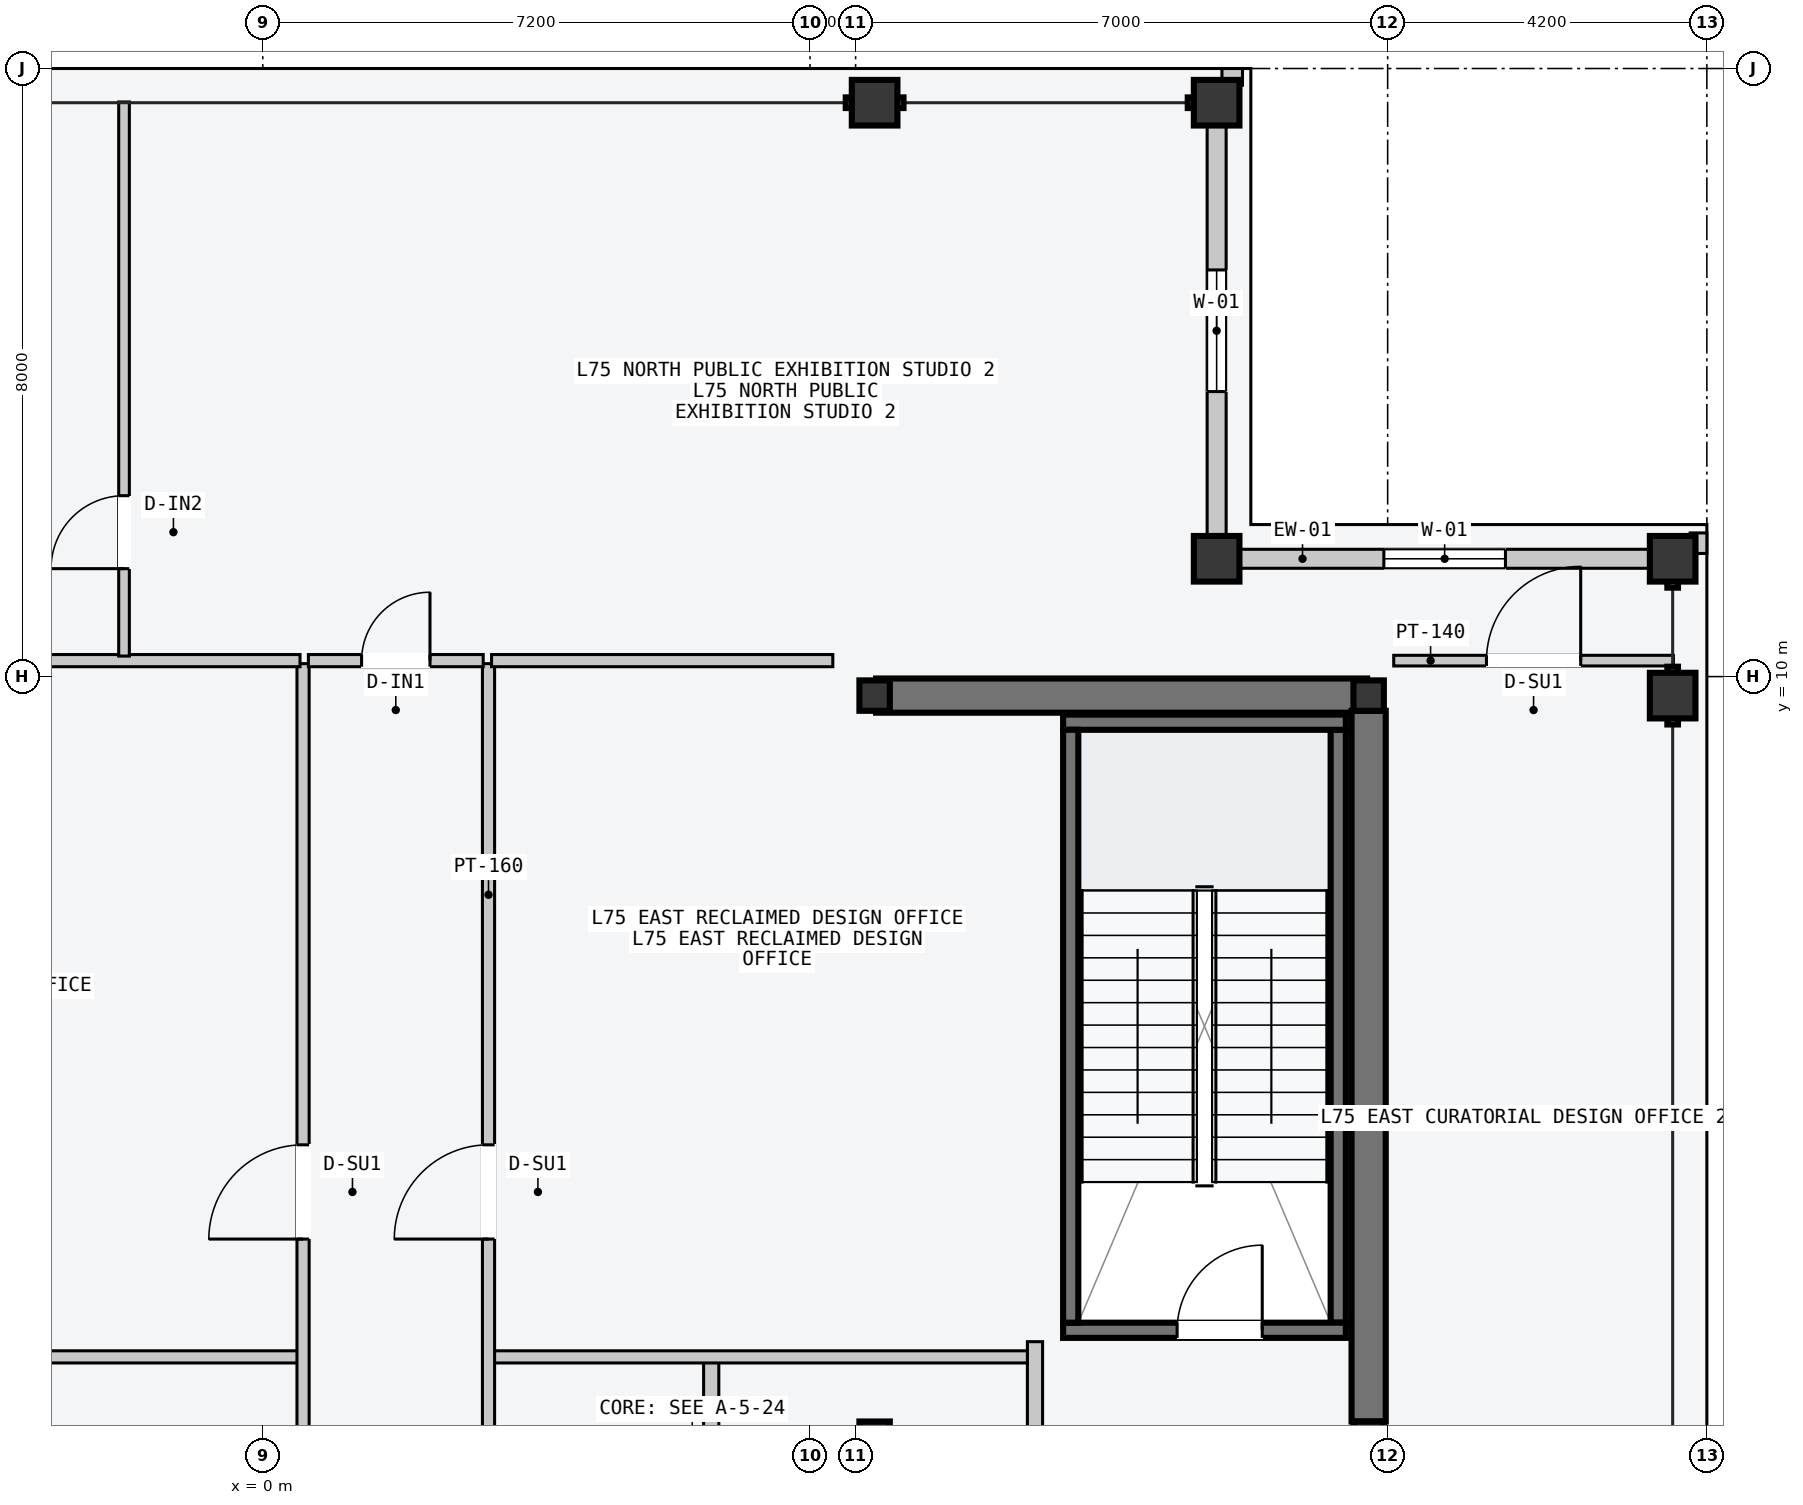
"""IFC4 building model, lengths in metres.
Left out: names, types, materials, properties, quantities, classifications, styles, units other than length and angle.
Written with IfcOpenShell. Run it as: python <this file> out.ifc"""

import sys

from ifc_helpers import new_model, si_unit, direction, frame, frame_2d, origin, origin_2d, place, context, subcontext, project, spatial, rectangle, hollow_rectangle, i_section, extrude, element, fill, save


model = new_model("IFC4")
c1 = context("Model", 3, precision=1e-05, world=origin(), true_north=direction((0.0, 1.0)))
c2 = subcontext(c1, "Body", "Model", "MODEL_VIEW")
j1 = project(units=[si_unit("LENGTHUNIT", "METRE"), si_unit("PLANEANGLEUNIT", "RADIAN")], contexts=[c1])
p1 = place(None, origin())
s1 = spatial("IfcSite", under=j1, at=p1, CompositionType="ELEMENT")
p2 = place(p1, origin())
s2 = spatial("IfcBuilding", under=s1, at=p2, CompositionType="ELEMENT")
p3 = place(p2, frame((0.0, 0.0, 284.4)))
s3 = spatial("IfcBuildingStorey", under=s2, at=p3, CompositionType="ELEMENT", Elevation=284.4)
p4 = place(p3, frame((8.07, 9.75, -0.2), z_axis=(0.0, 0.0, 1.0), x_axis=(1.0, 0.0, 0.0)))
e1 = element("IfcWall", 1, at=p4, inside=s3, PredefinedType="SHEAR", context=c2, shape_type="SweptSolid", body=[
    extrude(rectangle(XDim=6.46, YDim=0.45, at=frame_2d((3.23, 0.0))), origin(), (0.0, 0.0, 1.0), 4.8),
])
p5 = place(p3, frame((14.55, 0.2, -0.2), z_axis=(0.0, 0.0, 1.0), x_axis=(0.0, 1.0, 0.0)))
e2 = element("IfcWall", 2, at=p5, inside=s3, PredefinedType="SHEAR", context=c2, shape_type="SweptSolid", body=[
    extrude(rectangle(XDim=9.35, YDim=0.45, at=frame_2d((4.675, 0.0))), origin(), (0.0, 0.0, 1.0), 4.8),
])
p6 = place(p3, frame((14.15, 1.5, -0.2), z_axis=(0.0, 0.0, 1.0), x_axis=(0.0, 1.0, 0.0)))
e3 = element("IfcWall", 3, at=p6, inside=s3, PredefinedType="SOLIDWALL", context=c2, shape_type="SweptSolid", body=[
    extrude(rectangle(XDim=7.8, YDim=0.2, at=frame_2d((3.9, 0.0))), origin(), (0.0, 0.0, 1.0), 4.8),
])
p7 = place(p3, frame((10.53, 1.4, -0.2), z_axis=(0.0, 0.0, 1.0), x_axis=(1.0, 0.0, 0.0)))
e4 = element("IfcWall", 4, at=p7, inside=s3, PredefinedType="SOLIDWALL", context=c2, shape_type="SweptSolid", body=[
    extrude(rectangle(XDim=3.72, YDim=0.2, at=frame_2d((1.86, 0.0))), origin(), (0.0, 0.0, 1.0), 4.8),
])
p8 = place(p7, frame((1.5, 0.0, 0.2)))
e5 = element("IfcOpeningElement", 5, at=p8, cuts=e4, PredefinedType="OPENING", context=c2, shape_type="SweptSolid", body=[
    extrude(rectangle(XDim=1.12, YDim=2.18, at=frame_2d((0.56, 1.09))), frame((0.0, 0.11, 0.0), z_axis=(0.0, -1.0, 0.0), x_axis=(1.0, 0.0, 0.0)), (0.0, 0.0, 1.0), 0.22),
])
p9 = place(p3, frame((10.53, 9.4, -0.2), z_axis=(0.0, 0.0, 1.0), x_axis=(1.0, 0.0, 0.0)))
e6 = element("IfcWall", 6, at=p9, inside=s3, PredefinedType="SOLIDWALL", context=c2, shape_type="SweptSolid", body=[
    extrude(rectangle(XDim=3.72, YDim=0.2, at=frame_2d((1.86, 0.0))), origin(), (0.0, 0.0, 1.0), 4.8),
])
p10 = place(p3, frame((10.63, 1.5, -0.2), z_axis=(0.0, 0.0, 1.0), x_axis=(0.0, 1.0, 0.0)))
e7 = element("IfcWall", 7, at=p10, inside=s3, PredefinedType="SOLIDWALL", context=c2, shape_type="SweptSolid", body=[
    extrude(rectangle(XDim=7.8, YDim=0.2, at=frame_2d((3.9, 0.0))), origin(), (0.0, 0.0, 1.0), 4.8),
])
for number, where, z_axis, x_axis in (
    (8, (8.05, 0.0, 0.0), (0.0, 0.0, 1.0), (1.0, 0.0, 0.0)),
    (9, (8.05, 9.75, 0.0), (0.0, 0.0, 1.0), (1.0, 0.0, 0.0)),
    (10, (14.55, 0.0, 0.0), (0.0, 0.0, 1.0), (1.0, 0.0, 0.0)),
    (11, (14.55, 9.75, 0.0), (0.0, 0.0, 1.0), (1.0, 0.0, 0.0)),
):
    element("IfcColumn", number, at=place(p3, frame(where, z_axis=z_axis, x_axis=x_axis)), inside=s3, PredefinedType="COLUMN", context=c2, shape_type="SweptSolid", body=[
        extrude(i_section(OverallWidth=0.4, OverallDepth=0.4, WebThickness=0.013, FlangeThickness=0.021, at=origin_2d()), origin(), (0.0, 0.0, 1.0), 4.8),
    ])
for number, where, z_axis, x_axis in (
    (12, (8.05, 17.55, 0.0), (0.0, 0.0, 1.0), (1.0, 0.0, 0.0)),
    (13, (12.55, 17.55, 0.0), (0.0, 0.0, 1.0), (1.0, 0.0, 0.0)),
    (14, (18.55, 9.75, 0.0), (0.0, 0.0, 1.0), (0.0, 1.0, 0.0)),
    (15, (18.55, 11.55, 0.0), (0.0, 0.0, 1.0), (0.0, 1.0, 0.0)),
    (16, (12.55, 11.55, 0.0), (0.0, 0.0, 1.0), (1.0, 0.0, 0.0)),
):
    element("IfcColumn", number, at=place(p3, frame(where, z_axis=z_axis, x_axis=x_axis)), inside=s3, PredefinedType="COLUMN", context=c2, shape_type="SweptSolid", body=[
        extrude(hollow_rectangle(XDim=0.6, YDim=0.6, WallThickness=0.025, at=origin_2d()), origin(), (0.0, 0.0, 1.0), 4.8),
    ])
p11 = place(p3, frame((12.86, 11.55, 0.0), z_axis=(0.0, 0.0, 1.0), x_axis=(1.0, 0.0, 0.0)))
e17 = element("IfcWall", 17, at=p11, inside=s3, PredefinedType="STANDARD", context=c2, shape_type="SweptSolid", body=[
    extrude(rectangle(XDim=5.38, YDim=0.25, at=frame_2d((2.69, 0.0))), origin(), (0.0, 0.0, 1.0), 4.05),
])
p12 = place(p11, frame((1.89, 0.0, 0.85)))
e18 = element("IfcOpeningElement", 18, at=p12, cuts=e17, PredefinedType="OPENING", context=c2, shape_type="SweptSolid", body=[
    extrude(rectangle(XDim=1.6, YDim=2.0, at=frame_2d((0.8, 1.0))), frame((0.0, 0.135, 0.0), z_axis=(0.0, -1.0, 0.0), x_axis=(1.0, 0.0, 0.0)), (0.0, 0.0, 1.0), 0.27),
])
p13 = place(p3, frame((12.55, 11.86, 0.0), z_axis=(0.0, 0.0, 1.0), x_axis=(0.0, 1.0, 0.0)))
e19 = element("IfcWall", 19, at=p13, inside=s3, PredefinedType="STANDARD", context=c2, shape_type="SweptSolid", body=[
    extrude(rectangle(XDim=5.38, YDim=0.25, at=frame_2d((2.69, 0.0))), origin(), (0.0, 0.0, 1.0), 4.05),
])
p14 = place(p13, frame((1.89, 0.0, 0.85)))
e20 = element("IfcOpeningElement", 20, at=p14, cuts=e19, PredefinedType="OPENING", context=c2, shape_type="SweptSolid", body=[
    extrude(rectangle(XDim=1.6, YDim=2.0, at=frame_2d((0.8, 1.0))), frame((0.0, 0.135, 0.0), z_axis=(0.0, -1.0, 0.0), x_axis=(1.0, 0.0, 0.0)), (0.0, 0.0, 1.0), 0.27),
])
for number, where, z_axis, x_axis in (
    (21, (12.62, 17.89, 0.0), (0.0, 0.0, 1.0), (1.0, 0.0, 0.0)),
    (22, (18.89, 11.62, 0.0), (0.0, 0.0, 1.0), (0.0, 1.0, 0.0)),
):
    element("IfcWall", number, at=place(p3, frame(where, z_axis=z_axis, x_axis=x_axis)), inside=s3, PredefinedType="PARAPET", context=c2, shape_type="SweptSolid", body=[
        extrude(rectangle(XDim=0.27, YDim=0.22, at=frame_2d((0.135, 0.0))), origin(), (0.0, 0.0, 1.0), 1.2),
    ])
p15 = place(p3, frame((5.9, -9.45, 0.0), z_axis=(0.0, 0.0, 1.0), x_axis=(0.0, 1.0, 0.0)))
e23 = element("IfcWall", 23, at=p15, inside=s3, PredefinedType="PARTITIONING", context=c2, shape_type="SweptSolid", body=[
    extrude(rectangle(XDim=10.5, YDim=0.2, at=frame_2d((5.25, 0.0))), origin(), (0.0, 0.0, 1.0), 4.6),
])
p16 = place(p15, frame((3.9, 0.0, 0.0)))
e24 = element("IfcOpeningElement", 24, at=p16, cuts=e23, PredefinedType="OPENING", context=c2, shape_type="SweptSolid", body=[
    extrude(rectangle(XDim=1.5, YDim=2.2, at=frame_2d((0.75, 1.1))), frame((0.0, 0.11, 0.0), z_axis=(0.0, -1.0, 0.0), x_axis=(1.0, 0.0, 0.0)), (0.0, 0.0, 1.0), 0.22),
])
p17 = place(p3, frame((10.16, -2.55, 0.0), z_axis=(0.0, 0.0, 1.0), x_axis=(0.0, 1.0, 0.0)))
e25 = element("IfcWall", 25, at=p17, inside=s3, PredefinedType="PARTITIONING", context=c2, shape_type="SweptSolid", body=[
    extrude(rectangle(XDim=3.8, YDim=0.2, at=frame_2d((1.9, 0.0))), origin(), (0.0, 0.0, 1.0), 4.6),
])
p18 = place(p17, frame((1.3, 0.0, 0.0)))
e26 = element("IfcOpeningElement", 26, at=p18, cuts=e25, PredefinedType="OPENING", context=c2, shape_type="SweptSolid", body=[
    extrude(rectangle(XDim=1.1, YDim=2.15, at=frame_2d((0.55, 1.075))), frame((0.0, 0.11, 0.0), z_axis=(0.0, -1.0, 0.0), x_axis=(1.0, 0.0, 0.0)), (0.0, 0.0, 1.0), 0.22),
])
p19 = place(p3, frame((-10.05, 1.05, 0.0), z_axis=(0.0, 0.0, 1.0), x_axis=(1.0, 0.0, 0.0)))
e27 = element("IfcWall", 27, at=p19, inside=s3, PredefinedType="PARTITIONING", context=c2, shape_type="SweptSolid", body=[
    extrude(rectangle(XDim=10.54, YDim=0.16, at=frame_2d((5.27, 0.0))), origin(), (0.0, 0.0, 1.0), 4.6),
])
p20 = place(p3, frame((0.53, -3.5, 0.0), z_axis=(0.0, 0.0, 1.0), x_axis=(0.0, 1.0, 0.0)))
e28 = element("IfcWall", 28, at=p20, inside=s3, PredefinedType="PARTITIONING", context=c2, shape_type="SweptSolid", body=[
    extrude(rectangle(XDim=13.67, YDim=0.16, at=frame_2d((6.835, 0.0))), origin(), (0.0, 0.0, 1.0), 4.6),
])
p21 = place(p20, frame((6.1, 0.0, 0.0)))
e29 = element("IfcOpeningElement", 29, at=p21, cuts=e28, PredefinedType="OPENING", context=c2, shape_type="SweptSolid", body=[
    extrude(rectangle(XDim=1.24, YDim=2.24, at=frame_2d((0.62, 1.12))), frame((0.0, 0.09, 0.0), z_axis=(0.0, -1.0, 0.0), x_axis=(1.0, 0.0, 0.0)), (0.0, 0.0, 1.0), 0.18),
])
p22 = place(p20, frame((1.6, 0.0, 0.0)))
e30 = element("IfcOpeningElement", 30, at=p22, cuts=e28, PredefinedType="OPENING", context=c2, shape_type="SweptSolid", body=[
    extrude(rectangle(XDim=0.96, YDim=2.18, at=frame_2d((0.48, 1.09))), frame((0.0, 0.09, 0.0), z_axis=(0.0, -1.0, 0.0), x_axis=(1.0, 0.0, 0.0)), (0.0, 0.0, 1.0), 0.18),
])
p23 = place(p3, frame((-7.5, 10.21, 0.0), z_axis=(0.0, 0.0, 1.0), x_axis=(1.0, 0.0, 0.0)))
e31 = element("IfcWall", 31, at=p23, inside=s3, PredefinedType="PARTITIONING", context=c2, shape_type="SweptSolid", body=[
    extrude(rectangle(XDim=7.99, YDim=0.16, at=frame_2d((3.995, 0.0))), origin(), (0.0, 0.0, 1.0), 4.6),
])
p24 = place(p3, frame((3.01, 1.05, 0.0), z_axis=(0.0, 0.0, 1.0), x_axis=(1.0, 0.0, 0.0)))
e32 = element("IfcWall", 32, at=p24, inside=s3, PredefinedType="PARTITIONING", context=c2, shape_type="SweptSolid", body=[
    extrude(rectangle(XDim=7.05, YDim=0.16, at=frame_2d((3.525, 0.0))), origin(), (0.0, 0.0, 1.0), 4.6),
])
p25 = place(p3, frame((2.97, -3.5, 0.0), z_axis=(0.0, 0.0, 1.0), x_axis=(0.0, 1.0, 0.0)))
e33 = element("IfcWall", 33, at=p25, inside=s3, PredefinedType="PARTITIONING", context=c2, shape_type="SweptSolid", body=[
    extrude(rectangle(XDim=13.67, YDim=0.16, at=frame_2d((6.835, 0.0))), origin(), (0.0, 0.0, 1.0), 4.6),
])
p26 = place(p25, frame((6.1, 0.0, 0.0)))
e34 = element("IfcOpeningElement", 34, at=p26, cuts=e33, PredefinedType="OPENING", context=c2, shape_type="SweptSolid", body=[
    extrude(rectangle(XDim=1.24, YDim=2.24, at=frame_2d((0.62, 1.12))), frame((0.0, 0.09, 0.0), z_axis=(0.0, -1.0, 0.0), x_axis=(1.0, 0.0, 0.0)), (0.0, 0.0, 1.0), 0.18),
])
p27 = place(p25, frame((1.6, 0.0, 0.0)))
e35 = element("IfcOpeningElement", 35, at=p27, cuts=e33, PredefinedType="OPENING", context=c2, shape_type="SweptSolid", body=[
    extrude(rectangle(XDim=0.96, YDim=2.18, at=frame_2d((0.48, 1.09))), frame((0.0, 0.09, 0.0), z_axis=(0.0, -1.0, 0.0), x_axis=(1.0, 0.0, 0.0)), (0.0, 0.0, 1.0), 0.18),
])
p28 = place(p3, frame((3.01, 10.21, 0.0), z_axis=(0.0, 0.0, 1.0), x_axis=(1.0, 0.0, 0.0)))
e36 = element("IfcWall", 36, at=p28, inside=s3, PredefinedType="PARTITIONING", context=c2, shape_type="SweptSolid", body=[
    extrude(rectangle(XDim=4.49, YDim=0.16, at=frame_2d((2.245, 0.0))), origin(), (0.0, 0.0, 1.0), 4.6),
])
p29 = place(p3, frame((-1.826, 10.27, 0.0), z_axis=(0.0, 0.0, 1.0), x_axis=(0.0, 1.0, 0.0)))
e37 = element("IfcWall", 37, at=p29, inside=s3, PredefinedType="PARTITIONING", context=c2, shape_type="SweptSolid", body=[
    extrude(rectangle(XDim=7.29, YDim=0.14, at=frame_2d((3.645, 0.0))), origin(), (0.0, 0.0, 1.0), 4.6),
])
p30 = place(p29, frame((1.15, 0.0, 0.0)))
e38 = element("IfcOpeningElement", 38, at=p30, cuts=e37, PredefinedType="OPENING", context=c2, shape_type="SweptSolid", body=[
    extrude(rectangle(XDim=0.96, YDim=2.18, at=frame_2d((0.48, 1.09))), frame((0.0, 0.08, 0.0), z_axis=(0.0, -1.0, 0.0), x_axis=(1.0, 0.0, 0.0)), (0.0, 0.0, 1.0), 0.16),
])
p31 = place(p3, frame((0.6, 10.21, 0.0), z_axis=(0.0, 0.0, 1.0), x_axis=(1.0, 0.0, 0.0)))
e39 = element("IfcWall", 39, at=p31, inside=s3, PredefinedType="PARTITIONING", context=c2, shape_type="SweptSolid", body=[
    extrude(rectangle(XDim=2.3, YDim=0.16, at=frame_2d((1.15, 0.0))), origin(), (0.0, 0.0, 1.0), 4.6),
])
p32 = place(p31, frame((0.7, 0.0, 0.0)))
e40 = element("IfcOpeningElement", 40, at=p32, cuts=e39, PredefinedType="OPENING", context=c2, shape_type="SweptSolid", body=[
    extrude(rectangle(XDim=0.9, YDim=2.15, at=frame_2d((0.45, 1.075))), frame((0.0, 0.09, 0.0), z_axis=(0.0, -1.0, 0.0), x_axis=(1.0, 0.0, 0.0)), (0.0, 0.0, 1.0), 0.18),
])
p33 = place(p3, frame((14.88, 10.21, 0.0), z_axis=(0.0, 0.0, 1.0), x_axis=(1.0, 0.0, 0.0)))
e41 = element("IfcWall", 41, at=p33, inside=s3, PredefinedType="PARTITIONING", context=c2, shape_type="SweptSolid", body=[
    extrude(rectangle(XDim=3.68, YDim=0.14, at=frame_2d((1.84, 0.0))), origin(), (0.0, 0.0, 1.0), 4.6),
])
p34 = place(p33, frame((1.22, 0.0, 0.0)))
e42 = element("IfcOpeningElement", 42, at=p34, cuts=e41, PredefinedType="OPENING", context=c2, shape_type="SweptSolid", body=[
    extrude(rectangle(XDim=1.24, YDim=2.24, at=frame_2d((0.62, 1.12))), frame((0.0, 0.08, 0.0), z_axis=(0.0, -1.0, 0.0), x_axis=(1.0, 0.0, 0.0)), (0.0, 0.0, 1.0), 0.16),
])
p35 = place(p8, origin())
e43 = element("IfcDoor", 43, at=p35, inside=s3, OperationType="SINGLE_SWING_RIGHT", PredefinedType="DOOR", context=c2, shape_type="SweptSolid", body=[
    extrude(rectangle(XDim=1.12, YDim=2.18, at=frame_2d((0.56, 1.09))), frame((0.0, 0.025, 0.0), z_axis=(0.0, -1.0, 0.0), x_axis=(1.0, 0.0, 0.0)), (0.0, 0.0, 1.0), 0.05),
])
fill(e5, e43)
p36 = place(p12, origin())
e44 = element("IfcWindow", 44, at=p36, inside=s3, PartitioningType="SINGLE_PANEL", PredefinedType="WINDOW", context=c2, shape_type="SweptSolid", body=[
    extrude(rectangle(XDim=1.6, YDim=2.0, at=frame_2d((0.8, 1.0))), frame((0.0, 0.03, 0.0), z_axis=(0.0, -1.0, 0.0), x_axis=(1.0, 0.0, 0.0)), (0.0, 0.0, 1.0), 0.06),
])
fill(e18, e44)
p37 = place(p14, origin())
e45 = element("IfcWindow", 45, at=p37, inside=s3, PartitioningType="SINGLE_PANEL", PredefinedType="WINDOW", context=c2, shape_type="SweptSolid", body=[
    extrude(rectangle(XDim=1.6, YDim=2.0, at=frame_2d((0.8, 1.0))), frame((0.0, 0.03, 0.0), z_axis=(0.0, -1.0, 0.0), x_axis=(1.0, 0.0, 0.0)), (0.0, 0.0, 1.0), 0.06),
])
fill(e20, e45)
p38 = place(p21, origin())
e46 = element("IfcDoor", 46, at=p38, inside=s3, OperationType="SINGLE_SWING_LEFT", PredefinedType="DOOR", context=c2, shape_type="SweptSolid", body=[
    extrude(rectangle(XDim=1.24, YDim=2.24, at=frame_2d((0.62, 1.12))), frame((0.0, 0.025, 0.0), z_axis=(0.0, -1.0, 0.0), x_axis=(1.0, 0.0, 0.0)), (0.0, 0.0, 1.0), 0.05),
])
fill(e29, e46)
p39 = place(p26, origin())
e47 = element("IfcDoor", 47, at=p39, inside=s3, OperationType="SINGLE_SWING_LEFT", PredefinedType="DOOR", context=c2, shape_type="SweptSolid", body=[
    extrude(rectangle(XDim=1.24, YDim=2.24, at=frame_2d((0.62, 1.12))), frame((0.0, 0.025, 0.0), z_axis=(0.0, -1.0, 0.0), x_axis=(1.0, 0.0, 0.0)), (0.0, 0.0, 1.0), 0.05),
])
fill(e34, e47)
p40 = place(p30, origin())
e48 = element("IfcDoor", 48, at=p40, inside=s3, OperationType="SINGLE_SWING_LEFT", PredefinedType="DOOR", context=c2, shape_type="SweptSolid", body=[
    extrude(rectangle(XDim=0.96, YDim=2.18, at=frame_2d((0.48, 1.09))), frame((0.0, 0.025, 0.0), z_axis=(0.0, -1.0, 0.0), x_axis=(1.0, 0.0, 0.0)), (0.0, 0.0, 1.0), 0.05),
])
fill(e38, e48)
p41 = place(p32, origin())
e49 = element("IfcDoor", 49, at=p41, inside=s3, OperationType="SINGLE_SWING_RIGHT", PredefinedType="DOOR", context=c2, shape_type="SweptSolid", body=[
    extrude(rectangle(XDim=0.9, YDim=2.15, at=frame_2d((0.45, 1.075))), frame((0.0, 0.025, 0.0), z_axis=(0.0, -1.0, 0.0), x_axis=(1.0, 0.0, 0.0)), (0.0, 0.0, 1.0), 0.05),
])
fill(e40, e49)
p42 = place(p34, origin())
e50 = element("IfcDoor", 50, at=p42, inside=s3, OperationType="SINGLE_SWING_RIGHT", PredefinedType="DOOR", context=c2, shape_type="SweptSolid", body=[
    extrude(rectangle(XDim=1.24, YDim=2.24, at=frame_2d((0.62, 1.12))), frame((0.0, 0.025, 0.0), z_axis=(0.0, -1.0, 0.0), x_axis=(1.0, 0.0, 0.0)), (0.0, 0.0, 1.0), 0.05),
])
fill(e42, e50)
save(model, sys.argv[1])
